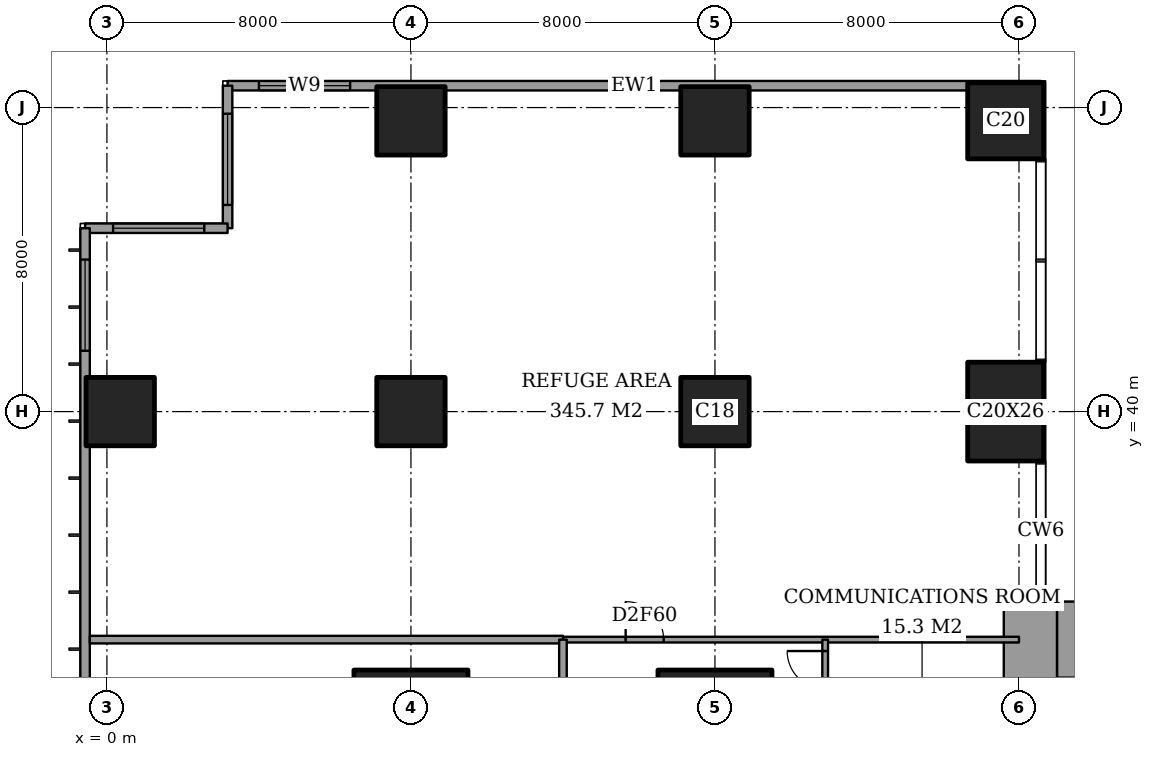
"""IFC4 building model, lengths in metres.
Left out: names, types, materials, properties, quantities, classifications, styles, units other than length and angle.
Written with IfcOpenShell. Run it as: python <this file> out.ifc"""

import sys

from ifc_helpers import new_model, si_unit, direction, frame, frame_2d, origin, origin_2d, place, context, subcontext, project, spatial, rectangle, extrude, element, fill, save


model = new_model("IFC4")
c1 = context("Model", 3, precision=1e-05, world=origin(), true_north=direction((0.0, 1.0)))
c2 = subcontext(c1, "Body", "Model", "MODEL_VIEW")
j1 = project(units=[si_unit("LENGTHUNIT", "METRE"), si_unit("PLANEANGLEUNIT", "RADIAN")], contexts=[c1])
p1 = place(None, origin())
s1 = spatial("IfcSite", under=j1, at=p1, CompositionType="ELEMENT")
p2 = place(p1, origin())
s2 = spatial("IfcBuilding", under=s1, at=p2, CompositionType="ELEMENT")
p3 = place(p2, frame((0.0, 0.0, 171.8)))
s3 = spatial("IfcBuildingStorey", under=s2, at=p3, CompositionType="ELEMENT", Elevation=171.8)
p4 = place(p3, frame((0.35, 40.0, 0.0), z_axis=(0.0, 0.0, 1.0), x_axis=(1.0, 0.0, 0.0)))
e1 = element("IfcColumn", 1, at=p4, inside=s3, PredefinedType="COLUMN", context=c2, shape_type="SweptSolid", body=[
    extrude(rectangle(XDim=1.8, YDim=1.8, at=origin_2d()), origin(), (0.0, 0.0, 1.0), 5.4),
])
p5 = place(p3, frame((8.0, 32.0, 0.0), z_axis=(0.0, 0.0, 1.0), x_axis=(1.0, 0.0, 0.0)))
e2 = element("IfcColumn", 2, at=p5, inside=s3, PredefinedType="COLUMN", context=c2, shape_type="SweptSolid", body=[
    extrude(rectangle(XDim=3.0, YDim=2.4, at=origin_2d()), origin(), (0.0, 0.0, 1.0), 5.4),
])
for number, where, z_axis, x_axis in (
    (3, (8.0, 40.0, 0.0), (0.0, 0.0, 1.0), (1.0, 0.0, 0.0)),
    (4, (8.0, 47.65, 0.0), (0.0, 0.0, 1.0), (1.0, 0.0, 0.0)),
):
    element("IfcColumn", number, at=place(p3, frame(where, z_axis=z_axis, x_axis=x_axis)), inside=s3, PredefinedType="COLUMN", context=c2, shape_type="SweptSolid", body=[
        extrude(rectangle(XDim=1.8, YDim=1.8, at=origin_2d()), origin(), (0.0, 0.0, 1.0), 5.4),
    ])
p6 = place(p3, frame((16.0, 32.0, 0.0), z_axis=(0.0, 0.0, 1.0), x_axis=(1.0, 0.0, 0.0)))
e5 = element("IfcColumn", 5, at=p6, inside=s3, PredefinedType="COLUMN", context=c2, shape_type="SweptSolid", body=[
    extrude(rectangle(XDim=3.0, YDim=2.4, at=origin_2d()), origin(), (0.0, 0.0, 1.0), 5.4),
])
for number, where, z_axis, x_axis in (
    (6, (16.0, 40.0, 0.0), (0.0, 0.0, 1.0), (1.0, 0.0, 0.0)),
    (7, (16.0, 47.65, 0.0), (0.0, 0.0, 1.0), (1.0, 0.0, 0.0)),
):
    element("IfcColumn", number, at=place(p3, frame(where, z_axis=z_axis, x_axis=x_axis)), inside=s3, PredefinedType="COLUMN", context=c2, shape_type="SweptSolid", body=[
        extrude(rectangle(XDim=1.8, YDim=1.8, at=origin_2d()), origin(), (0.0, 0.0, 1.0), 5.4),
    ])
p7 = place(p3, frame((23.65, 40.0, 0.0), z_axis=(0.0, 0.0, 1.0), x_axis=(1.0, 0.0, 0.0)))
e8 = element("IfcColumn", 8, at=p7, inside=s3, PredefinedType="COLUMN", context=c2, shape_type="SweptSolid", body=[
    extrude(rectangle(XDim=2.0, YDim=2.6, at=origin_2d()), origin(), (0.0, 0.0, 1.0), 5.4),
])
p8 = place(p3, frame((23.65, 47.65, 0.0), z_axis=(0.0, 0.0, 1.0), x_axis=(1.0, 0.0, 0.0)))
e9 = element("IfcColumn", 9, at=p8, inside=s3, PredefinedType="COLUMN", context=c2, shape_type="SweptSolid", body=[
    extrude(rectangle(XDim=2.0, YDim=2.0, at=origin_2d()), origin(), (0.0, 0.0, 1.0), 5.4),
])
p9 = place(p3, frame((25.0, 34.0, 0.0), z_axis=(0.0, 0.0, 1.0), x_axis=(1.0, 0.0, 0.0)))
e10 = element("IfcWall", 10, at=p9, inside=s3, PredefinedType="SHEAR", context=c2, shape_type="SweptSolid", body=[
    extrude(rectangle(XDim=3.15, YDim=2.0, at=frame_2d((1.575, 0.0))), origin(), (0.0, 0.0, 1.0), 5.4),
])
p10 = place(p3, frame((24.3, 23.15, 0.0), z_axis=(0.0, 0.0, 1.0), x_axis=(0.0, 1.0, 0.0)))
e11 = element("IfcWall", 11, at=p10, inside=s3, PredefinedType="SHEAR", context=c2, shape_type="SweptSolid", body=[
    extrude(rectangle(XDim=11.85, YDim=1.4, at=frame_2d((5.925, 0.0))), origin(), (0.0, 0.0, 1.0), 5.4),
])
p11 = place(p10, frame((0.75, 0.0, 0.0)))
e12 = element("IfcOpeningElement", 12, at=p11, cuts=e11, PredefinedType="OPENING", context=c2, shape_type="SweptSolid", body=[
    extrude(rectangle(XDim=1.8, YDim=2.4, at=frame_2d((0.9, 1.2))), frame((0.0, 0.71, 0.0), z_axis=(0.0, -1.0, 0.0), x_axis=(1.0, 0.0, 0.0)), (0.0, 0.0, 1.0), 1.42),
])
p12 = place(p3, frame((24.575, 48.575, 0.0), z_axis=(0.0, 0.0, 1.0), x_axis=(-1.0, 0.0, 0.0)))
e13 = element("IfcWall", 13, at=p12, inside=s3, PredefinedType="SOLIDWALL", context=c2, shape_type="SweptSolid", body=[
    extrude(rectangle(XDim=21.4, YDim=0.25, at=frame_2d((10.7, 0.0))), origin(), (0.0, 0.0, 1.0), 5.4),
])
p13 = place(p12, frame((18.175, 0.0, 0.9)))
e14 = element("IfcOpeningElement", 14, at=p13, cuts=e13, PredefinedType="OPENING", context=c2, shape_type="SweptSolid", body=[
    extrude(rectangle(XDim=2.4, YDim=2.4, at=frame_2d((1.2, 1.2))), frame((0.0, 0.135, 0.0), z_axis=(0.0, -1.0, 0.0), x_axis=(1.0, 0.0, 0.0)), (0.0, 0.0, 1.0), 0.27),
])
p14 = place(p3, frame((3.175, 48.575, 0.0), z_axis=(0.0, 0.0, 1.0), x_axis=(0.0, -1.0, 0.0)))
e15 = element("IfcWall", 15, at=p14, inside=s3, PredefinedType="SOLIDWALL", context=c2, shape_type="SweptSolid", body=[
    extrude(rectangle(XDim=3.75, YDim=0.25, at=frame_2d((1.875, 0.0))), origin(), (0.0, 0.0, 1.0), 5.4),
])
p15 = place(p14, frame((0.738, 0.0, 0.9)))
e16 = element("IfcOpeningElement", 16, at=p15, cuts=e15, PredefinedType="OPENING", context=c2, shape_type="SweptSolid", body=[
    extrude(rectangle(XDim=2.4, YDim=2.4, at=frame_2d((1.2, 1.2))), frame((0.0, 0.135, 0.0), z_axis=(0.0, -1.0, 0.0), x_axis=(1.0, 0.0, 0.0)), (0.0, 0.0, 1.0), 0.27),
])
p16 = place(p3, frame((3.175, 44.825, 0.0), z_axis=(0.0, 0.0, 1.0), x_axis=(-1.0, 0.0, 0.0)))
e17 = element("IfcWall", 17, at=p16, inside=s3, PredefinedType="SOLIDWALL", context=c2, shape_type="SweptSolid", body=[
    extrude(rectangle(XDim=3.75, YDim=0.25, at=frame_2d((1.875, 0.0))), origin(), (0.0, 0.0, 1.0), 5.4),
])
p17 = place(p16, frame((0.613, 0.0, 0.9)))
e18 = element("IfcOpeningElement", 18, at=p17, cuts=e17, PredefinedType="OPENING", context=c2, shape_type="SweptSolid", body=[
    extrude(rectangle(XDim=2.4, YDim=2.4, at=frame_2d((1.2, 1.2))), frame((0.0, 0.135, 0.0), z_axis=(0.0, -1.0, 0.0), x_axis=(1.0, 0.0, 0.0)), (0.0, 0.0, 1.0), 0.27),
])
p18 = place(p3, frame((-0.575, 44.825, 0.0), z_axis=(0.0, 0.0, 1.0), x_axis=(0.0, -1.0, 0.0)))
e19 = element("IfcWall", 19, at=p18, inside=s3, PredefinedType="SOLIDWALL", context=c2, shape_type="SweptSolid", body=[
    extrude(rectangle(XDim=41.65, YDim=0.25, at=frame_2d((20.825, 0.0))), origin(), (0.0, 0.0, 1.0), 5.4),
])
p19 = place(p18, frame((0.825, 0.0, 0.9)))
e20 = element("IfcOpeningElement", 20, at=p19, cuts=e19, PredefinedType="OPENING", context=c2, shape_type="SweptSolid", body=[
    extrude(rectangle(XDim=2.4, YDim=2.4, at=frame_2d((1.2, 1.2))), frame((0.0, 0.135, 0.0), z_axis=(0.0, -1.0, 0.0), x_axis=(1.0, 0.0, 0.0)), (0.0, 0.0, 1.0), 0.27),
])
p20 = place(p18, frame((38.425, 0.0, 0.9)))
e21 = element("IfcOpeningElement", 21, at=p20, cuts=e19, PredefinedType="OPENING", context=c2, shape_type="SweptSolid", body=[
    extrude(rectangle(XDim=2.4, YDim=2.4, at=frame_2d((1.2, 1.2))), frame((0.0, 0.135, 0.0), z_axis=(0.0, -1.0, 0.0), x_axis=(1.0, 0.0, 0.0)), (0.0, 0.0, 1.0), 0.27),
])
p21 = place(p3, frame((-0.45, 34.0, 0.0), z_axis=(0.0, 0.0, 1.0), x_axis=(1.0, 0.0, 0.0)))
e22 = element("IfcWall", 22, at=p21, inside=s3, PredefinedType="PARTITIONING", context=c2, shape_type="SweptSolid", body=[
    extrude(rectangle(XDim=12.45, YDim=0.2, at=frame_2d((6.225, 0.0))), origin(), (0.0, 0.0, 1.0), 5.15),
])
p22 = place(p3, frame((12.0, 34.0, 0.0), z_axis=(0.0, 0.0, 1.0), x_axis=(1.0, 0.0, 0.0)))
e23 = element("IfcWall", 23, at=p22, inside=s3, PredefinedType="PARTITIONING", context=c2, shape_type="SweptSolid", body=[
    extrude(rectangle(XDim=12.0, YDim=0.15, at=frame_2d((6.0, 0.0))), origin(), (0.0, 0.0, 1.0), 5.15),
])
p23 = place(p22, frame((1.65, 0.0, 0.0)))
e24 = element("IfcOpeningElement", 24, at=p23, cuts=e23, PredefinedType="OPENING", context=c2, shape_type="SweptSolid", body=[
    extrude(rectangle(XDim=1.0, YDim=2.1, at=frame_2d((0.5, 1.05))), frame((0.0, 0.085, 0.0), z_axis=(0.0, -1.0, 0.0), x_axis=(1.0, 0.0, 0.0)), (0.0, 0.0, 1.0), 0.17),
])
p24 = place(p3, frame((12.0, 30.725, 0.0), z_axis=(0.0, 0.0, 1.0), x_axis=(0.0, 1.0, 0.0)))
e25 = element("IfcWall", 25, at=p24, inside=s3, PredefinedType="PARTITIONING", context=c2, shape_type="SweptSolid", body=[
    extrude(rectangle(XDim=3.275, YDim=0.2, at=frame_2d((1.637, 0.0))), origin(), (0.0, 0.0, 1.0), 5.15),
])
p25 = place(p3, frame((18.9, 31.0, 0.0), z_axis=(0.0, 0.0, 1.0), x_axis=(0.0, 1.0, 0.0)))
e26 = element("IfcWall", 26, at=p25, inside=s3, PredefinedType="PARTITIONING", context=c2, shape_type="SweptSolid", body=[
    extrude(rectangle(XDim=3.0, YDim=0.15, at=frame_2d((1.5, 0.0))), origin(), (0.0, 0.0, 1.0), 5.15),
])
p26 = place(p25, frame((1.7, 0.0, 0.0)))
e27 = element("IfcOpeningElement", 27, at=p26, cuts=e26, PredefinedType="OPENING", context=c2, shape_type="SweptSolid", body=[
    extrude(rectangle(XDim=1.0, YDim=2.1, at=frame_2d((0.5, 1.05))), frame((0.0, 0.085, 0.0), z_axis=(0.0, -1.0, 0.0), x_axis=(1.0, 0.0, 0.0)), (0.0, 0.0, 1.0), 0.17),
])
p27 = place(p13, origin())
e28 = element("IfcWindow", 28, at=p27, inside=s3, PartitioningType="SINGLE_PANEL", PredefinedType="WINDOW", context=c2, shape_type="SweptSolid", body=[
    extrude(rectangle(XDim=2.4, YDim=2.4, at=frame_2d((1.2, 1.2))), frame((0.0, 0.03, 0.0), z_axis=(0.0, -1.0, 0.0), x_axis=(1.0, 0.0, 0.0)), (0.0, 0.0, 1.0), 0.06),
])
fill(e14, e28)
p28 = place(p15, origin())
e29 = element("IfcWindow", 29, at=p28, inside=s3, PartitioningType="SINGLE_PANEL", PredefinedType="WINDOW", context=c2, shape_type="SweptSolid", body=[
    extrude(rectangle(XDim=2.4, YDim=2.4, at=frame_2d((1.2, 1.2))), frame((0.0, 0.03, 0.0), z_axis=(0.0, -1.0, 0.0), x_axis=(1.0, 0.0, 0.0)), (0.0, 0.0, 1.0), 0.06),
])
fill(e16, e29)
p29 = place(p17, origin())
e30 = element("IfcWindow", 30, at=p29, inside=s3, PartitioningType="SINGLE_PANEL", PredefinedType="WINDOW", context=c2, shape_type="SweptSolid", body=[
    extrude(rectangle(XDim=2.4, YDim=2.4, at=frame_2d((1.2, 1.2))), frame((0.0, 0.03, 0.0), z_axis=(0.0, -1.0, 0.0), x_axis=(1.0, 0.0, 0.0)), (0.0, 0.0, 1.0), 0.06),
])
fill(e18, e30)
p30 = place(p19, origin())
e31 = element("IfcWindow", 31, at=p30, inside=s3, PartitioningType="SINGLE_PANEL", PredefinedType="WINDOW", context=c2, shape_type="SweptSolid", body=[
    extrude(rectangle(XDim=2.4, YDim=2.4, at=frame_2d((1.2, 1.2))), frame((0.0, 0.03, 0.0), z_axis=(0.0, -1.0, 0.0), x_axis=(1.0, 0.0, 0.0)), (0.0, 0.0, 1.0), 0.06),
])
fill(e20, e31)
p31 = place(p23, origin())
e32 = element("IfcDoor", 32, at=p31, inside=s3, OperationType="SINGLE_SWING_RIGHT", PredefinedType="DOOR", context=c2, shape_type="SweptSolid", body=[
    extrude(rectangle(XDim=1.0, YDim=2.1, at=frame_2d((0.5, 1.05))), frame((0.0, 0.025, 0.0), z_axis=(0.0, -1.0, 0.0), x_axis=(1.0, 0.0, 0.0)), (0.0, 0.0, 1.0), 0.05),
])
fill(e24, e32)
p32 = place(p26, origin())
e33 = element("IfcDoor", 33, at=p32, inside=s3, OperationType="SINGLE_SWING_LEFT", PredefinedType="DOOR", context=c2, shape_type="SweptSolid", body=[
    extrude(rectangle(XDim=1.0, YDim=2.1, at=frame_2d((0.5, 1.05))), frame((0.0, 0.025, 0.0), z_axis=(0.0, -1.0, 0.0), x_axis=(1.0, 0.0, 0.0)), (0.0, 0.0, 1.0), 0.05),
])
fill(e27, e33)
save(model, sys.argv[1])
